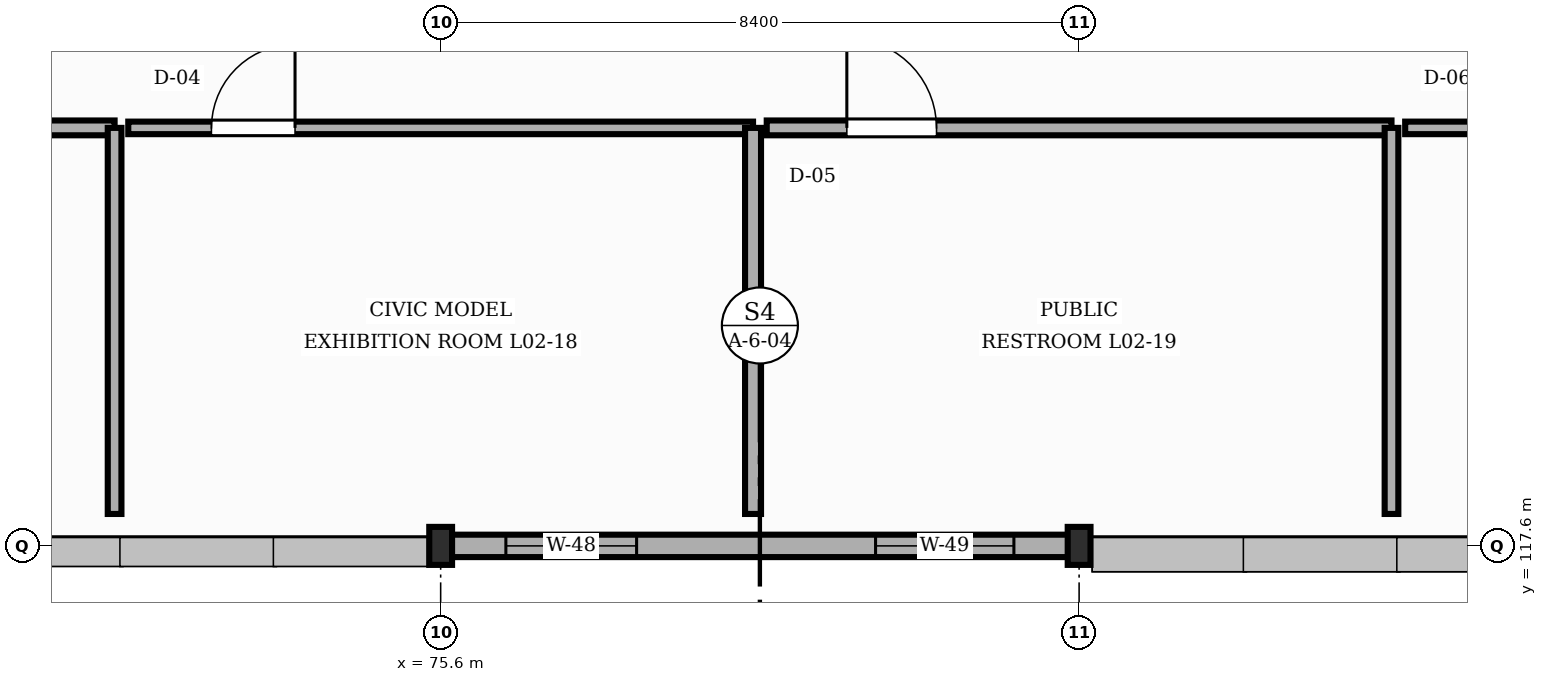
"""IFC4 building model, lengths in metres.
Left out: names, types, materials, properties, quantities, classifications, styles, units other than length and angle.
Written with IfcOpenShell. Run it as: python <this file> out.ifc"""

import sys

from ifc_helpers import new_model, si_unit, direction, frame, frame_2d, origin, origin_2d, place, context, subcontext, project, spatial, rectangle, i_section, extrude, element, fill, save


model = new_model("IFC4")
c1 = context("Model", 3, precision=1e-05, world=origin(), true_north=direction((0.0, 1.0)))
c2 = subcontext(c1, "Body", "Model", "MODEL_VIEW")
j1 = project(units=[si_unit("LENGTHUNIT", "METRE"), si_unit("PLANEANGLEUNIT", "RADIAN")], contexts=[c1])
p1 = place(None, origin())
s1 = spatial("IfcSite", under=j1, at=p1, CompositionType="ELEMENT")
p2 = place(p1, origin())
s2 = spatial("IfcBuilding", under=s1, at=p2, CompositionType="ELEMENT")
p3 = place(p2, frame((0.0, 0.0, 9.9)))
s3 = spatial("IfcBuildingStorey", under=s2, at=p3, CompositionType="ELEMENT", Elevation=9.9)
for number, where, z_axis, x_axis in (
    (1, (75.6, 117.6, 0.0), (0.0, 0.0, 1.0), (1.0, 0.0, 0.0)),
    (2, (84.0, 117.6, 0.0), (0.0, 0.0, 1.0), (1.0, 0.0, 0.0)),
):
    element("IfcColumn", number, at=place(p3, frame(where, z_axis=z_axis, x_axis=x_axis)), inside=s3, PredefinedType="COLUMN", context=c2, shape_type="SweptSolid", body=[
        extrude(i_section(OverallWidth=0.3, OverallDepth=0.5, WebThickness=0.014, FlangeThickness=0.028, FilletRadius=0.027, at=origin_2d()), origin(), (0.0, 0.0, 1.0), 4.05),
    ])
p4 = place(p3, frame((75.608, 117.6, 0.0), z_axis=(0.0, 0.0, 1.0), x_axis=(1.0, 0.0, 0.0)))
e3 = element("IfcWall", 3, at=p4, inside=s3, PredefinedType="STANDARD", context=c2, shape_type="SweptSolid", body=[
    extrude(rectangle(XDim=8.384, YDim=0.295, at=frame_2d((4.192, 0.0))), origin(), (0.0, 0.0, 1.0), 3.502),
])
p5 = place(p4, frame((0.85, 0.0, 0.9)))
e4 = element("IfcOpeningElement", 4, at=p5, cuts=e3, PredefinedType="OPENING", context=c2, shape_type="SweptSolid", body=[
    extrude(rectangle(XDim=1.72, YDim=1.85, at=frame_2d((0.86, 0.925))), frame((0.0, 0.157, 0.0), z_axis=(0.0, -1.0, 0.0), x_axis=(1.0, 0.0, 0.0)), (0.0, 0.0, 1.0), 0.315),
])
p6 = place(p4, frame((5.714, 0.0, 0.9)))
e5 = element("IfcOpeningElement", 5, at=p6, cuts=e3, PredefinedType="OPENING", context=c2, shape_type="SweptSolid", body=[
    extrude(rectangle(XDim=1.82, YDim=1.85, at=frame_2d((0.91, 0.925))), frame((0.0, 0.157, 0.0), z_axis=(0.0, -1.0, 0.0), x_axis=(1.0, 0.0, 0.0)), (0.0, 0.0, 1.0), 0.315),
])
p7 = place(p3, frame((63.09, 123.1, -0.004), z_axis=(0.0, 0.0, 1.0), x_axis=(1.0, 0.0, 0.0)))
e6 = element("IfcWall", 6, at=p7, inside=s3, PredefinedType="STANDARD", context=c2, shape_type="SweptSolid", body=[
    extrude(rectangle(XDim=8.22, YDim=0.195, at=frame_2d((4.11, 0.0))), origin(), (0.0, 0.0, 1.0), 3.844),
])
p8 = place(p7, frame((1.124, 0.0, 0.0)))
e7 = element("IfcOpeningElement", 7, at=p8, cuts=e6, PredefinedType="OPENING", context=c2, shape_type="SweptSolid", body=[
    extrude(rectangle(XDim=1.04, YDim=2.06, at=frame_2d((0.52, 1.03))), frame((0.0, 0.107, 0.0), z_axis=(0.0, -1.0, 0.0), x_axis=(1.0, 0.0, 0.0)), (0.0, 0.0, 1.0), 0.215),
])
p9 = place(p3, frame((71.31, 123.1, -0.004), z_axis=(0.0, 0.0, 1.0), x_axis=(0.0, -1.0, 0.0)))
e8 = element("IfcWall", 8, at=p9, inside=s3, PredefinedType="STANDARD", context=c2, shape_type="SweptSolid", body=[
    extrude(rectangle(XDim=5.08, YDim=0.18, at=frame_2d((2.54, 0.0))), origin(), (0.0, 0.0, 1.0), 3.844),
])
p10 = place(p3, frame((71.49, 123.1, -0.004), z_axis=(0.0, 0.0, 1.0), x_axis=(1.0, 0.0, 0.0)))
e9 = element("IfcWall", 9, at=p10, inside=s3, PredefinedType="STANDARD", context=c2, shape_type="SweptSolid", body=[
    extrude(rectangle(XDim=8.22, YDim=0.165, at=frame_2d((4.11, 0.0))), origin(), (0.0, 0.0, 1.0), 3.844),
])
p11 = place(p10, frame((1.094, 0.0, 0.0)))
e10 = element("IfcOpeningElement", 10, at=p11, cuts=e9, PredefinedType="OPENING", context=c2, shape_type="SweptSolid", body=[
    extrude(rectangle(XDim=1.1, YDim=2.06, at=frame_2d((0.55, 1.03))), frame((0.0, 0.093, 0.0), z_axis=(0.0, -1.0, 0.0), x_axis=(1.0, 0.0, 0.0)), (0.0, 0.0, 1.0), 0.185),
])
p12 = place(p3, frame((79.71, 123.1, -0.004), z_axis=(0.0, 0.0, 1.0), x_axis=(0.0, -1.0, 0.0)))
e11 = element("IfcWall", 11, at=p12, inside=s3, PredefinedType="STANDARD", context=c2, shape_type="SweptSolid", body=[
    extrude(rectangle(XDim=5.08, YDim=0.21, at=frame_2d((2.54, 0.0))), origin(), (0.0, 0.0, 1.0), 3.844),
])
p13 = place(p3, frame((79.89, 123.1, -0.004), z_axis=(0.0, 0.0, 1.0), x_axis=(1.0, 0.0, 0.0)))
e12 = element("IfcWall", 12, at=p13, inside=s3, PredefinedType="STANDARD", context=c2, shape_type="SweptSolid", body=[
    extrude(rectangle(XDim=8.22, YDim=0.195, at=frame_2d((4.11, 0.0))), origin(), (0.0, 0.0, 1.0), 3.844),
])
p14 = place(p13, frame((1.054, 0.0, 0.0)))
e13 = element("IfcOpeningElement", 13, at=p14, cuts=e12, PredefinedType="OPENING", context=c2, shape_type="SweptSolid", body=[
    extrude(rectangle(XDim=1.18, YDim=2.06, at=frame_2d((0.59, 1.03))), frame((0.0, 0.107, 0.0), z_axis=(0.0, -1.0, 0.0), x_axis=(1.0, 0.0, 0.0)), (0.0, 0.0, 1.0), 0.215),
])
p15 = place(p3, frame((88.11, 123.1, -0.004), z_axis=(0.0, 0.0, 1.0), x_axis=(0.0, -1.0, 0.0)))
e14 = element("IfcWall", 14, at=p15, inside=s3, PredefinedType="STANDARD", context=c2, shape_type="SweptSolid", body=[
    extrude(rectangle(XDim=5.08, YDim=0.18, at=frame_2d((2.54, 0.0))), origin(), (0.0, 0.0, 1.0), 3.844),
])
p16 = place(p3, frame((88.29, 123.1, -0.004), z_axis=(0.0, 0.0, 1.0), x_axis=(1.0, 0.0, 0.0)))
e15 = element("IfcWall", 15, at=p16, inside=s3, PredefinedType="STANDARD", context=c2, shape_type="SweptSolid", body=[
    extrude(rectangle(XDim=8.22, YDim=0.165, at=frame_2d((4.11, 0.0))), origin(), (0.0, 0.0, 1.0), 3.844),
])
p17 = place(p16, frame((1.004, 0.0, 0.0)))
e16 = element("IfcOpeningElement", 16, at=p17, cuts=e15, PredefinedType="OPENING", context=c2, shape_type="SweptSolid", body=[
    extrude(rectangle(XDim=1.28, YDim=2.06, at=frame_2d((0.64, 1.03))), frame((0.0, 0.093, 0.0), z_axis=(0.0, -1.0, 0.0), x_axis=(1.0, 0.0, 0.0)), (0.0, 0.0, 1.0), 0.185),
])
p18 = place(p5, origin())
e17 = element("IfcWindow", 17, at=p18, inside=s3, PartitioningType="SINGLE_PANEL", PredefinedType="WINDOW", context=c2, shape_type="SweptSolid", body=[
    extrude(rectangle(XDim=1.72, YDim=1.85, at=frame_2d((0.86, 0.925))), frame((0.0, 0.03, 0.0), z_axis=(0.0, -1.0, 0.0), x_axis=(1.0, 0.0, 0.0)), (0.0, 0.0, 1.0), 0.06),
])
fill(e4, e17)
p19 = place(p6, origin())
e18 = element("IfcWindow", 18, at=p19, inside=s3, PartitioningType="SINGLE_PANEL", PredefinedType="WINDOW", context=c2, shape_type="SweptSolid", body=[
    extrude(rectangle(XDim=1.82, YDim=1.85, at=frame_2d((0.91, 0.925))), frame((0.0, 0.03, 0.0), z_axis=(0.0, -1.0, 0.0), x_axis=(1.0, 0.0, 0.0)), (0.0, 0.0, 1.0), 0.06),
])
fill(e5, e18)
p20 = place(p11, origin())
e19 = element("IfcDoor", 19, at=p20, inside=s3, OperationType="SINGLE_SWING_RIGHT", PredefinedType="DOOR", context=c2, shape_type="SweptSolid", body=[
    extrude(rectangle(XDim=1.1, YDim=2.06, at=frame_2d((0.55, 1.03))), frame((0.0, 0.025, 0.0), z_axis=(0.0, -1.0, 0.0), x_axis=(1.0, 0.0, 0.0)), (0.0, 0.0, 1.0), 0.05),
])
fill(e10, e19)
p21 = place(p14, origin())
e20 = element("IfcDoor", 20, at=p21, inside=s3, OperationType="SINGLE_SWING_LEFT", PredefinedType="DOOR", context=c2, shape_type="SweptSolid", body=[
    extrude(rectangle(XDim=1.18, YDim=2.06, at=frame_2d((0.59, 1.03))), frame((0.0, 0.025, 0.0), z_axis=(0.0, -1.0, 0.0), x_axis=(1.0, 0.0, 0.0)), (0.0, 0.0, 1.0), 0.05),
])
fill(e13, e20)
save(model, sys.argv[1])
